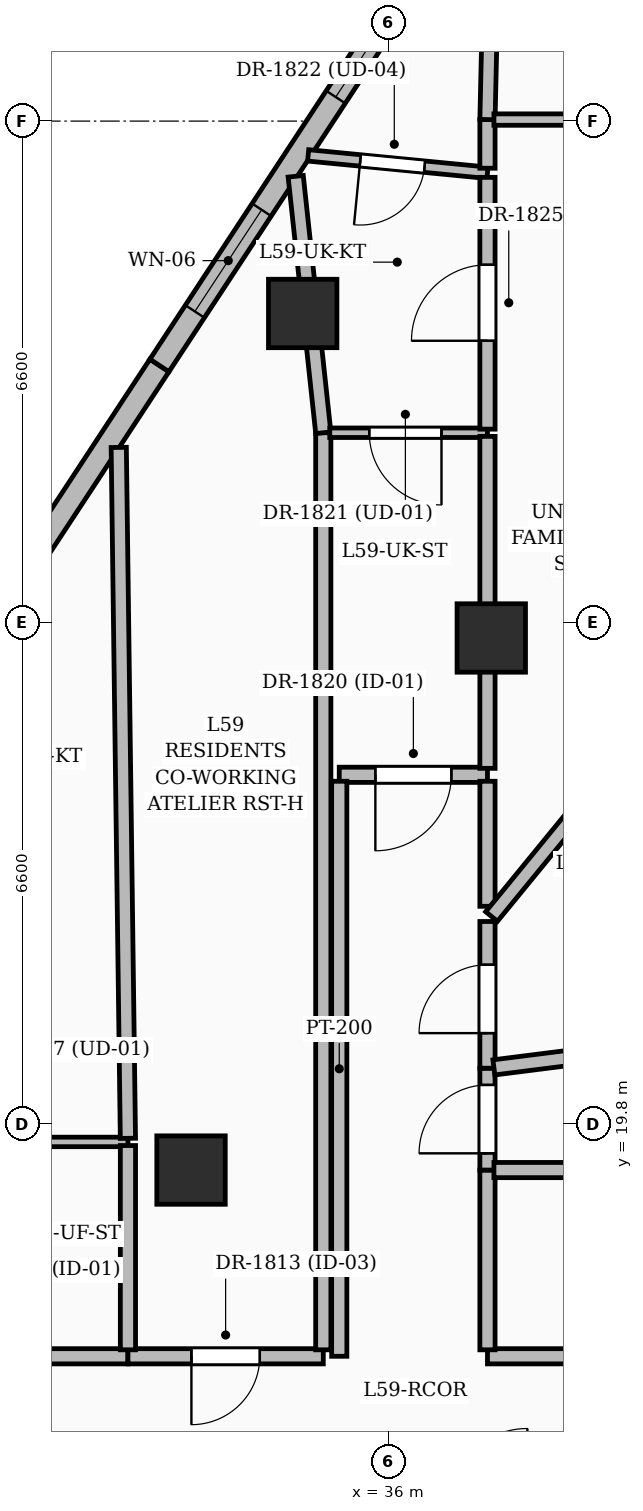
"""IFC4 building model, lengths in metres.
Left out: names, types, materials, properties, quantities, classifications, styles, units other than length and angle.
Written with IfcOpenShell. Run it as: python <this file> out.ifc"""

import sys

from ifc_helpers import new_model, si_unit, direction, frame, frame_2d, origin, origin_2d, place, context, subcontext, project, spatial, rectangle, extrude, element, fill, save


model = new_model("IFC4")
c1 = context("Model", 3, precision=1e-05, world=origin(), true_north=direction((0.0, 1.0)))
c2 = subcontext(c1, "Body", "Model", "MODEL_VIEW")
j1 = project(units=[si_unit("LENGTHUNIT", "METRE"), si_unit("PLANEANGLEUNIT", "RADIAN")], contexts=[c1])
p1 = place(None, origin())
s1 = spatial("IfcSite", under=j1, at=p1, CompositionType="ELEMENT")
p2 = place(p1, origin())
s2 = spatial("IfcBuilding", under=s1, at=p2, CompositionType="ELEMENT")
p3 = place(p2, frame((0.0, 0.0, 229.5)))
s3 = spatial("IfcBuildingStorey", under=s2, at=p3, CompositionType="ELEMENT", Elevation=229.5)
for number, where, z_axis, x_axis in (
    (1, (37.35, 26.2, 0.0), (0.0, 0.0, 1.0), (1.0, 0.0, 0.0)),
    (2, (33.4, 19.2, 0.0), (0.0, 0.0, 1.0), (1.0, 0.0, 0.0)),
    (3, (34.869, 30.469, 0.0), (0.0, 0.0, 1.0), (1.0, 0.0, 0.0)),
):
    element("IfcColumn", number, at=place(p3, frame(where, z_axis=z_axis, x_axis=x_axis)), inside=s3, PredefinedType="COLUMN", context=c2, shape_type="SweptSolid", body=[
        extrude(rectangle(XDim=0.9, YDim=0.9, at=origin_2d()), origin(), (0.0, 0.0, 1.0), 3.75),
    ])
p4 = place(p3, frame((28.864, 23.514, 0.0), z_axis=(0.0, 0.0, 1.0), x_axis=(0.549033751048, 0.835800179595, 0.0)))
e4 = element("IfcWall", 4, at=p4, inside=s3, PredefinedType="SOLIDWALL", context=c2, shape_type="SweptSolid", body=[
    extrude(rectangle(XDim=7.504, YDim=0.3, at=frame_2d((3.752, 0.0))), origin(), (0.0, 0.0, 1.0), 3.5),
])
p5 = place(p4, frame((2.125, 0.0, 0.6)))
e5 = element("IfcOpeningElement", 5, at=p5, cuts=e4, PredefinedType="OPENING", context=c2, shape_type="SweptSolid", body=[
    extrude(rectangle(XDim=1.8, YDim=2.1, at=frame_2d((0.9, 1.05))), frame((0.0, 0.16, 0.0), z_axis=(0.0, -1.0, 0.0), x_axis=(1.0, 0.0, 0.0)), (0.0, 0.0, 1.0), 0.32),
])
p6 = place(p3, frame((32.984, 29.785, 0.0), z_axis=(0.0, 0.0, 1.0), x_axis=(0.549071408683, 0.835775441232, 0.0)))
e6 = element("IfcWall", 6, at=p6, inside=s3, PredefinedType="SOLIDWALL", context=c2, shape_type="SweptSolid", body=[
    extrude(rectangle(XDim=7.504, YDim=0.3, at=frame_2d((3.752, 0.0))), origin(), (0.0, 0.0, 1.0), 3.5),
])
p7 = place(p6, frame((0.85, 0.0, 0.55)))
e7 = element("IfcOpeningElement", 7, at=p7, cuts=e6, PredefinedType="OPENING", context=c2, shape_type="SweptSolid", body=[
    extrude(rectangle(XDim=1.6, YDim=2.2, at=frame_2d((0.8, 1.1))), frame((0.0, 0.16, 0.0), z_axis=(0.0, -1.0, 0.0), x_axis=(1.0, 0.0, 0.0)), (0.0, 0.0, 1.0), 0.32),
])
p8 = place(p6, frame((4.225, 0.0, 0.55)))
e8 = element("IfcOpeningElement", 8, at=p8, cuts=e6, PredefinedType="OPENING", context=c2, shape_type="SweptSolid", body=[
    extrude(rectangle(XDim=1.6, YDim=2.2, at=frame_2d((0.8, 1.1))), frame((0.0, 0.16, 0.0), z_axis=(0.0, -1.0, 0.0), x_axis=(1.0, 0.0, 0.0)), (0.0, 0.0, 1.0), 0.32),
])
p9 = place(p3, frame((32.57, 16.75, 0.0), z_axis=(0.0, 0.0, 1.0), x_axis=(-1.0, 0.0, 0.0)))
e9 = element("IfcWall", 9, at=p9, inside=s3, PredefinedType="PARTITIONING", context=c2, shape_type="SweptSolid", body=[
    extrude(rectangle(XDim=3.71, YDim=0.2, at=frame_2d((1.855, 0.0))), origin(), (0.0, 0.0, 1.0), 3.5),
])
p10 = place(p9, frame((1.413, 0.0, 0.0)))
e10 = element("IfcOpeningElement", 10, at=p10, cuts=e9, PredefinedType="OPENING", context=c2, shape_type="SweptSolid", body=[
    extrude(rectangle(XDim=1.0, YDim=2.2, at=frame_2d((0.5, 1.1))), frame((0.0, 0.11, 0.0), z_axis=(0.0, -1.0, 0.0), x_axis=(1.0, 0.0, 0.0)), (0.0, 0.0, 1.0), 0.22),
])
p11 = place(p3, frame((40.31, 16.75, 0.0), z_axis=(0.0, 0.0, 1.0), x_axis=(-1.0, 0.0, 0.0)))
e11 = element("IfcWall", 11, at=p11, inside=s3, PredefinedType="PARTITIONING", context=c2, shape_type="SweptSolid", body=[
    extrude(rectangle(XDim=3.01, YDim=0.2, at=frame_2d((1.505, 0.0))), origin(), (0.0, 0.0, 1.0), 3.5),
])
p12 = place(p11, frame((1.055, 0.0, 0.0)))
e12 = element("IfcOpeningElement", 12, at=p12, cuts=e11, PredefinedType="OPENING", context=c2, shape_type="SweptSolid", body=[
    extrude(rectangle(XDim=0.9, YDim=2.1, at=frame_2d((0.45, 1.05))), frame((0.0, 0.11, 0.0), z_axis=(0.0, -1.0, 0.0), x_axis=(1.0, 0.0, 0.0)), (0.0, 0.0, 1.0), 0.22),
])
p13 = place(p3, frame((37.3, 16.835, 0.0), z_axis=(0.0, 0.0, 1.0), x_axis=(0.0, 1.0, 0.0)))
e13 = element("IfcWall", 13, at=p13, inside=s3, PredefinedType="PARTITIONING", context=c2, shape_type="SweptSolid", body=[
    extrude(rectangle(XDim=2.365, YDim=0.2, at=frame_2d((1.183, 0.0))), origin(), (0.0, 0.0, 1.0), 3.5),
])
p14 = place(p3, frame((37.3, 19.2, 0.0), z_axis=(0.0, 0.0, 1.0), x_axis=(0.0, 1.0, 0.0)))
e14 = element("IfcWall", 14, at=p14, inside=s3, PredefinedType="PARTITIONING", context=c2, shape_type="SweptSolid", body=[
    extrude(rectangle(XDim=1.34, YDim=0.2, at=frame_2d((0.67, 0.0))), origin(), (0.0, 0.0, 1.0), 3.5),
])
p15 = place(p14, frame((0.22, 0.0, 0.0)))
e15 = element("IfcOpeningElement", 15, at=p15, cuts=e14, PredefinedType="OPENING", context=c2, shape_type="SweptSolid", body=[
    extrude(rectangle(XDim=0.9, YDim=2.1, at=frame_2d((0.45, 1.05))), frame((0.0, 0.11, 0.0), z_axis=(0.0, -1.0, 0.0), x_axis=(1.0, 0.0, 0.0)), (0.0, 0.0, 1.0), 0.22),
])
p16 = place(p3, frame((35.14, 16.75, 0.0), z_axis=(0.0, 0.0, 1.0), x_axis=(-1.0, 0.0, 0.0)))
e16 = element("IfcWall", 16, at=p16, inside=s3, PredefinedType="PARTITIONING", context=c2, shape_type="SweptSolid", body=[
    extrude(rectangle(XDim=2.57, YDim=0.2, at=frame_2d((1.285, 0.0))), origin(), (0.0, 0.0, 1.0), 2.685),
])
p17 = place(p16, frame((0.835, 0.0, 0.0)))
e17 = element("IfcOpeningElement", 17, at=p17, cuts=e16, PredefinedType="OPENING", context=c2, shape_type="SweptSolid", body=[
    extrude(rectangle(XDim=0.9, YDim=2.1, at=frame_2d((0.45, 1.05))), frame((0.0, 0.11, 0.0), z_axis=(0.0, -1.0, 0.0), x_axis=(1.0, 0.0, 0.0)), (0.0, 0.0, 1.0), 0.22),
])
p18 = place(p3, frame((37.3, 20.54, 0.0), z_axis=(0.0, 0.0, 1.0), x_axis=(0.0, 1.0, 0.0)))
e18 = element("IfcWall", 18, at=p18, inside=s3, PredefinedType="PARTITIONING", context=c2, shape_type="SweptSolid", body=[
    extrude(rectangle(XDim=1.93, YDim=0.2, at=frame_2d((0.965, 0.0))), origin(), (0.0, 0.0, 1.0), 3.5),
])
p19 = place(p18, frame((0.461, 0.0, 0.0)))
e19 = element("IfcOpeningElement", 19, at=p19, cuts=e18, PredefinedType="OPENING", context=c2, shape_type="SweptSolid", body=[
    extrude(rectangle(XDim=0.9, YDim=2.1, at=frame_2d((0.45, 1.05))), frame((0.0, 0.11, 0.0), z_axis=(0.0, -1.0, 0.0), x_axis=(1.0, 0.0, 0.0)), (0.0, 0.0, 1.0), 0.22),
])
p20 = place(p3, frame((37.3, 24.4, 0.0), z_axis=(0.0, 0.0, 1.0), x_axis=(-1.0, 0.0, 0.0)))
e20 = element("IfcWall", 20, at=p20, inside=s3, PredefinedType="PARTITIONING", context=c2, shape_type="SweptSolid", body=[
    extrude(rectangle(XDim=1.95, YDim=0.2, at=frame_2d((0.975, 0.0))), origin(), (0.0, 0.0, 1.0), 2.685),
])
p21 = place(p20, frame((0.475, 0.0, 0.0)))
e21 = element("IfcOpeningElement", 21, at=p21, cuts=e20, PredefinedType="OPENING", context=c2, shape_type="SweptSolid", body=[
    extrude(rectangle(XDim=1.0, YDim=2.2, at=frame_2d((0.5, 1.1))), frame((0.0, 0.11, 0.0), z_axis=(0.0, -1.0, 0.0), x_axis=(1.0, 0.0, 0.0)), (0.0, 0.0, 1.0), 0.22),
])
p22 = place(p3, frame((35.35, 24.315, 0.0), z_axis=(0.0, 0.0, 1.0), x_axis=(0.0, -1.0, 0.0)))
e22 = element("IfcWall", 22, at=p22, inside=s3, PredefinedType="PARTITIONING", context=c2, shape_type="SweptSolid", body=[
    extrude(rectangle(XDim=7.565, YDim=0.2, at=frame_2d((3.782, 0.0))), origin(), (0.0, 0.0, 1.0), 2.685),
])
p23 = place(p3, frame((37.3, 22.67, 0.0), z_axis=(0.0, 0.0, 1.0), x_axis=(0.0, 1.0, 0.0)))
e23 = element("IfcWall", 23, at=p23, inside=s3, PredefinedType="PARTITIONING", context=c2, shape_type="SweptSolid", body=[
    extrude(rectangle(XDim=1.645, YDim=0.2, at=frame_2d((0.823, 0.0))), origin(), (0.0, 0.0, 1.0), 3.5),
])
p24 = place(p3, frame((32.57, 19.57, 0.0), z_axis=(0.0, 0.0, 1.0), x_axis=(-1.0, 0.0, 0.0)))
e24 = element("IfcWall", 24, at=p24, inside=s3, PredefinedType="PARTITIONING", context=c2, shape_type="SweptSolid", body=[
    extrude(rectangle(XDim=3.71, YDim=0.125, at=frame_2d((1.855, 0.0))), origin(), (0.0, 0.0, 1.0), 3.01),
])
p25 = place(p24, frame((1.321, 0.0, 0.0)))
e25 = element("IfcOpeningElement", 25, at=p25, cuts=e24, PredefinedType="OPENING", context=c2, shape_type="SweptSolid", body=[
    extrude(rectangle(XDim=0.95, YDim=2.2, at=frame_2d((0.475, 1.1))), frame((0.0, 0.072, 0.0), z_axis=(0.0, -1.0, 0.0), x_axis=(1.0, 0.0, 0.0)), (0.0, 0.0, 1.0), 0.145),
])
p26 = place(p3, frame((32.57, 16.835, 0.0), z_axis=(0.0, 0.0, 1.0), x_axis=(0.0, 1.0, 0.0)))
e26 = element("IfcWall", 26, at=p26, inside=s3, PredefinedType="PARTITIONING", context=c2, shape_type="SweptSolid", body=[
    extrude(rectangle(XDim=2.688, YDim=0.2, at=frame_2d((1.344, 0.0))), origin(), (0.0, 0.0, 1.0), 3.5),
])
p27 = place(p3, frame((32.57, 19.617, 0.0), z_axis=(0.0, 0.0, 1.0), x_axis=(-0.013267344969, 0.999911984905, 0.0)))
e27 = element("IfcWall", 27, at=p27, inside=s3, PredefinedType="PARTITIONING", context=c2, shape_type="SweptSolid", body=[
    extrude(rectangle(XDim=9.09, YDim=0.2, at=frame_2d((4.545, 0.0))), origin(), (0.0, 0.0, 1.0), 2.685),
])
p28 = place(p3, frame((40.31, 19.2, 0.0), z_axis=(0.0, 0.0, 1.0), x_axis=(-1.0, 0.0, 0.0)))
e28 = element("IfcWall", 28, at=p28, inside=s3, PredefinedType="PARTITIONING", context=c2, shape_type="SweptSolid", body=[
    extrude(rectangle(XDim=2.925, YDim=0.2, at=frame_2d((1.462, 0.0))), origin(), (0.0, 0.0, 1.0), 3.5),
])
p29 = place(p3, frame((48.067, 21.904, 0.0), z_axis=(0.0, 0.0, 1.0), x_axis=(-0.992068591321, -0.125697693351, 0.0)))
e29 = element("IfcWall", 29, at=p29, inside=s3, PredefinedType="PARTITIONING", context=c2, shape_type="SweptSolid", body=[
    extrude(rectangle(XDim=10.768, YDim=0.2, at=frame_2d((5.384, 0.0))), origin(), (0.0, 0.0, 1.0), 2.685),
])
p30 = place(p3, frame((35.14, 16.835, 0.0), z_axis=(0.0, 0.0, 1.0), x_axis=(0.0, 1.0, 0.0)))
e30 = element("IfcWall", 30, at=p30, inside=s3, PredefinedType="PARTITIONING", context=c2, shape_type="SweptSolid", body=[
    extrude(rectangle(XDim=12.065, YDim=0.2, at=frame_2d((6.032, 0.0))), origin(), (0.0, 0.0, 1.0), 2.685),
])
p31 = place(p3, frame((35.14, 28.9, 0.0), z_axis=(0.0, 0.0, 1.0), x_axis=(-0.106909076614, 0.99426880135, 0.0)))
e31 = element("IfcWall", 31, at=p31, inside=s3, PredefinedType="PARTITIONING", context=c2, shape_type="SweptSolid", body=[
    extrude(rectangle(XDim=3.394, YDim=0.2, at=frame_2d((1.697, 0.0))), origin(), (0.0, 0.0, 1.0), 2.685),
])
p32 = place(p3, frame((40.41, 26.27, 0.0), z_axis=(0.0, 0.0, 1.0), x_axis=(-0.633356256794, -0.773860356899, 0.0)))
e32 = element("IfcWall", 32, at=p32, inside=s3, PredefinedType="PARTITIONING", context=c2, shape_type="SweptSolid", body=[
    extrude(rectangle(XDim=4.825, YDim=0.2, at=frame_2d((2.413, 0.0))), origin(), (0.0, 0.0, 1.0), 2.685),
])
p33 = place(p3, frame((37.3, 28.9, 0.0), z_axis=(0.0, 0.0, 1.0), x_axis=(-1.0, 0.0, 0.0)))
e33 = element("IfcWall", 33, at=p33, inside=s3, PredefinedType="PARTITIONING", context=c2, shape_type="SweptSolid", body=[
    extrude(rectangle(XDim=2.075, YDim=0.125, at=frame_2d((1.038, 0.0))), origin(), (0.0, 0.0, 1.0), 2.685),
])
p34 = place(p33, frame((0.605, 0.0, 0.0)))
e34 = element("IfcOpeningElement", 34, at=p34, cuts=e33, PredefinedType="OPENING", context=c2, shape_type="SweptSolid", body=[
    extrude(rectangle(XDim=0.95, YDim=2.2, at=frame_2d((0.475, 1.1))), frame((0.0, 0.072, 0.0), z_axis=(0.0, -1.0, 0.0), x_axis=(1.0, 0.0, 0.0)), (0.0, 0.0, 1.0), 0.145),
])
p35 = place(p3, frame((37.3, 24.485, 0.0), z_axis=(0.0, 0.0, 1.0), x_axis=(0.0, 1.0, 0.0)))
e35 = element("IfcWall", 35, at=p35, inside=s3, PredefinedType="PARTITIONING", context=c2, shape_type="SweptSolid", body=[
    extrude(rectangle(XDim=4.367, YDim=0.2, at=frame_2d((2.184, 0.0))), origin(), (0.0, 0.0, 1.0), 2.685),
])
p36 = place(p3, frame((37.3, 32.32, 0.0), z_axis=(0.0, 0.0, 1.0), x_axis=(-0.995321617962, 0.096617166268, 0.0)))
e36 = element("IfcWall", 36, at=p36, inside=s3, PredefinedType="PARTITIONING", context=c2, shape_type="SweptSolid", body=[
    extrude(rectangle(XDim=2.37, YDim=0.15, at=frame_2d((1.185, 0.0))), origin(), (0.0, 0.0, 1.0), 3.5),
])
p37 = place(p36, frame((0.832, 0.0, 0.0)))
e37 = element("IfcOpeningElement", 37, at=p37, cuts=e36, PredefinedType="OPENING", context=c2, shape_type="SweptSolid", body=[
    extrude(rectangle(XDim=0.85, YDim=2.1, at=frame_2d((0.425, 1.05))), frame((0.0, 0.085, 0.0), z_axis=(0.0, -1.0, 0.0), x_axis=(1.0, 0.0, 0.0)), (0.0, 0.0, 1.0), 0.17),
])
p38 = place(p3, frame((37.3, 28.948, 0.0), z_axis=(0.0, 0.0, 1.0), x_axis=(0.0, 1.0, 0.0)))
e38 = element("IfcWall", 38, at=p38, inside=s3, PredefinedType="PARTITIONING", context=c2, shape_type="SweptSolid", body=[
    extrude(rectangle(XDim=3.312, YDim=0.2, at=frame_2d((1.656, 0.0))), origin(), (0.0, 0.0, 1.0), 2.82),
])
p39 = place(p38, frame((1.163, 0.0, 0.0)))
e39 = element("IfcOpeningElement", 39, at=p39, cuts=e38, PredefinedType="OPENING", context=c2, shape_type="SweptSolid", body=[
    extrude(rectangle(XDim=1.0, YDim=2.2, at=frame_2d((0.5, 1.1))), frame((0.0, 0.11, 0.0), z_axis=(0.0, -1.0, 0.0), x_axis=(1.0, 0.0, 0.0)), (0.0, 0.0, 1.0), 0.22),
])
p40 = place(p3, frame((37.3, 32.38, 0.0), z_axis=(0.0, 0.0, 1.0), x_axis=(0.0, 1.0, 0.0)))
e40 = element("IfcWall", 40, at=p40, inside=s3, PredefinedType="PARTITIONING", context=c2, shape_type="SweptSolid", body=[
    extrude(rectangle(XDim=0.64, YDim=0.2, at=frame_2d((0.32, 0.0))), origin(), (0.0, 0.0, 1.0), 3.5),
])
p41 = place(p3, frame((37.3, 33.02, 0.0), z_axis=(0.0, 0.0, 1.0), x_axis=(0.022614904422, 0.999744250345, 0.0)))
e41 = element("IfcWall", 41, at=p41, inside=s3, PredefinedType="PARTITIONING", context=c2, shape_type="SweptSolid", body=[
    extrude(rectangle(XDim=1.771, YDim=0.2, at=frame_2d((0.885, 0.0))), origin(), (0.0, 0.0, 1.0), 3.5),
])
p42 = place(p3, frame((40.35, 33.02, 0.0), z_axis=(0.0, 0.0, 1.0), x_axis=(-1.0, 0.0, 0.0)))
e42 = element("IfcWall", 42, at=p42, inside=s3, PredefinedType="PARTITIONING", context=c2, shape_type="SweptSolid", body=[
    extrude(rectangle(XDim=2.965, YDim=0.15, at=frame_2d((1.482, 0.0))), origin(), (0.0, 0.0, 1.0), 3.5),
])
p43 = place(p42, frame((1.012, 0.0, 0.0)))
e43 = element("IfcOpeningElement", 43, at=p43, cuts=e42, PredefinedType="OPENING", context=c2, shape_type="SweptSolid", body=[
    extrude(rectangle(XDim=0.85, YDim=2.1, at=frame_2d((0.425, 1.05))), frame((0.0, 0.085, 0.0), z_axis=(0.0, -1.0, 0.0), x_axis=(1.0, 0.0, 0.0)), (0.0, 0.0, 1.0), 0.17),
])
p44 = place(p7, origin())
e44 = element("IfcWindow", 44, at=p44, inside=s3, PartitioningType="SINGLE_PANEL", PredefinedType="WINDOW", context=c2, shape_type="SweptSolid", body=[
    extrude(rectangle(XDim=1.6, YDim=2.2, at=frame_2d((0.8, 1.1))), frame((0.0, 0.03, 0.0), z_axis=(0.0, -1.0, 0.0), x_axis=(1.0, 0.0, 0.0)), (0.0, 0.0, 1.0), 0.06),
])
fill(e7, e44)
p45 = place(p8, origin())
e45 = element("IfcWindow", 45, at=p45, inside=s3, PartitioningType="SINGLE_PANEL", PredefinedType="WINDOW", context=c2, shape_type="SweptSolid", body=[
    extrude(rectangle(XDim=1.6, YDim=2.2, at=frame_2d((0.8, 1.1))), frame((0.0, 0.03, 0.0), z_axis=(0.0, -1.0, 0.0), x_axis=(1.0, 0.0, 0.0)), (0.0, 0.0, 1.0), 0.06),
])
fill(e8, e45)
p46 = place(p17, origin())
e46 = element("IfcDoor", 46, at=p46, inside=s3, OperationType="SINGLE_SWING_RIGHT", PredefinedType="DOOR", context=c2, shape_type="SweptSolid", body=[
    extrude(rectangle(XDim=0.9, YDim=2.1, at=frame_2d((0.45, 1.05))), frame((0.0, 0.025, 0.0), z_axis=(0.0, -1.0, 0.0), x_axis=(1.0, 0.0, 0.0)), (0.0, 0.0, 1.0), 0.05),
])
fill(e17, e46)
p47 = place(p19, origin())
e47 = element("IfcDoor", 47, at=p47, inside=s3, OperationType="SINGLE_SWING_LEFT", PredefinedType="DOOR", context=c2, shape_type="SweptSolid", body=[
    extrude(rectangle(XDim=0.9, YDim=2.1, at=frame_2d((0.45, 1.05))), frame((0.0, 0.025, 0.0), z_axis=(0.0, -1.0, 0.0), x_axis=(1.0, 0.0, 0.0)), (0.0, 0.0, 1.0), 0.05),
])
fill(e19, e47)
p48 = place(p15, origin())
e48 = element("IfcDoor", 48, at=p48, inside=s3, OperationType="SINGLE_SWING_LEFT", PredefinedType="DOOR", context=c2, shape_type="SweptSolid", body=[
    extrude(rectangle(XDim=0.9, YDim=2.1, at=frame_2d((0.45, 1.05))), frame((0.0, 0.025, 0.0), z_axis=(0.0, -1.0, 0.0), x_axis=(1.0, 0.0, 0.0)), (0.0, 0.0, 1.0), 0.05),
])
fill(e15, e48)
p49 = place(p21, origin())
e49 = element("IfcDoor", 49, at=p49, inside=s3, OperationType="SINGLE_SWING_RIGHT", PredefinedType="DOOR", context=c2, shape_type="SweptSolid", body=[
    extrude(rectangle(XDim=1.0, YDim=2.2, at=frame_2d((0.5, 1.1))), frame((0.0, 0.025, 0.0), z_axis=(0.0, -1.0, 0.0), x_axis=(1.0, 0.0, 0.0)), (0.0, 0.0, 1.0), 0.05),
])
fill(e21, e49)
p50 = place(p34, origin())
e50 = element("IfcDoor", 50, at=p50, inside=s3, OperationType="SINGLE_SWING_LEFT", PredefinedType="DOOR", context=c2, shape_type="SweptSolid", body=[
    extrude(rectangle(XDim=0.95, YDim=2.2, at=frame_2d((0.475, 1.1))), frame((0.0, 0.025, 0.0), z_axis=(0.0, -1.0, 0.0), x_axis=(1.0, 0.0, 0.0)), (0.0, 0.0, 1.0), 0.05),
])
fill(e34, e50)
p51 = place(p37, origin())
e51 = element("IfcDoor", 51, at=p51, inside=s3, OperationType="SINGLE_SWING_RIGHT", PredefinedType="DOOR", context=c2, shape_type="SweptSolid", body=[
    extrude(rectangle(XDim=0.85, YDim=2.1, at=frame_2d((0.425, 1.05))), frame((0.0, 0.025, 0.0), z_axis=(0.0, -1.0, 0.0), x_axis=(1.0, 0.0, 0.0)), (0.0, 0.0, 1.0), 0.05),
])
fill(e37, e51)
p52 = place(p39, origin())
e52 = element("IfcDoor", 52, at=p52, inside=s3, OperationType="SINGLE_SWING_LEFT", PredefinedType="DOOR", context=c2, shape_type="SweptSolid", body=[
    extrude(rectangle(XDim=1.0, YDim=2.2, at=frame_2d((0.5, 1.1))), frame((0.0, 0.025, 0.0), z_axis=(0.0, -1.0, 0.0), x_axis=(1.0, 0.0, 0.0)), (0.0, 0.0, 1.0), 0.05),
])
fill(e39, e52)
save(model, sys.argv[1])
